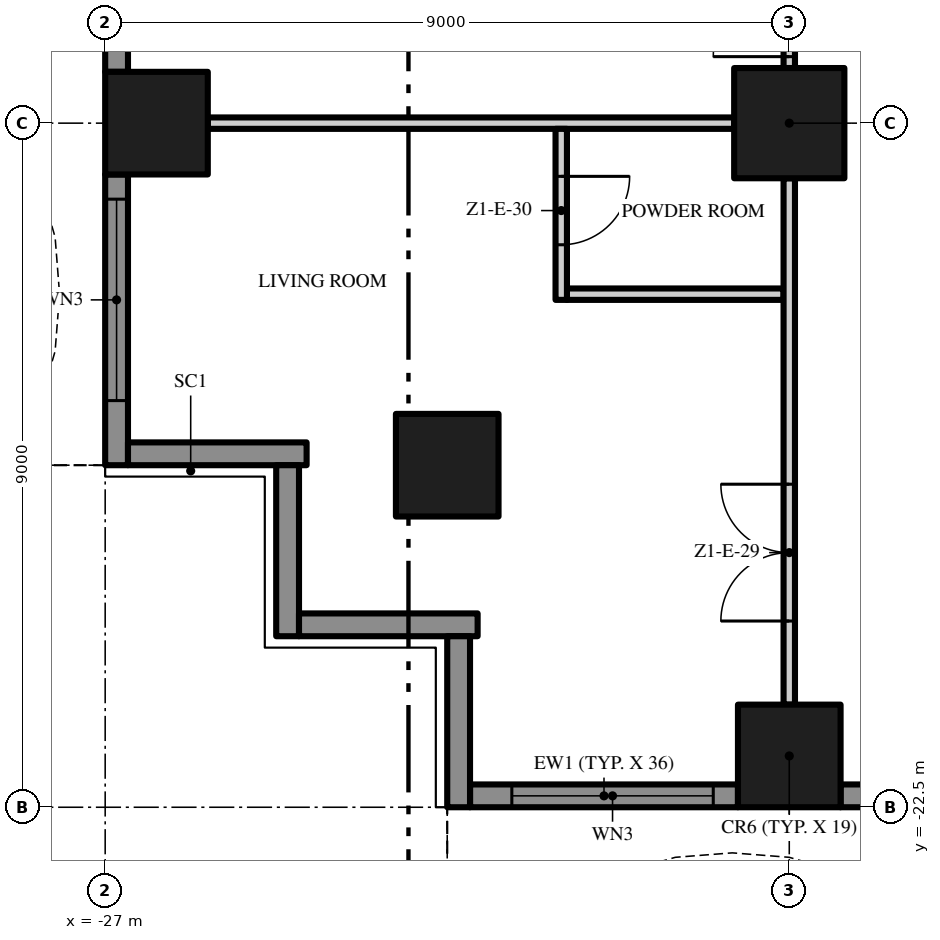
"""IFC4 building model, lengths in metres.
Left out: names, types, materials, properties, quantities, classifications, styles, units other than length and angle.
Written with IfcOpenShell. Run it as: python <this file> out.ifc"""

import sys

from ifc_helpers import new_model, si_unit, direction, frame, frame_2d, origin, origin_2d, place, context, subcontext, project, spatial, polyline, rectangle, outline, extrude, element, fill, save


model = new_model("IFC4")
c1 = context("Model", 3, precision=1e-05, world=origin(), true_north=direction((0.0, 1.0)))
c2 = subcontext(c1, "Body", "Model", "MODEL_VIEW")
j1 = project(units=[si_unit("LENGTHUNIT", "METRE"), si_unit("PLANEANGLEUNIT", "RADIAN")], contexts=[c1])
p1 = place(None, origin())
s1 = spatial("IfcSite", under=j1, at=p1, CompositionType="ELEMENT")
p2 = place(p1, origin())
s2 = spatial("IfcBuilding", under=s1, at=p2, CompositionType="ELEMENT")
p3 = place(p2, frame((0.0, 0.0, 60.6)))
s3 = spatial("IfcBuildingStorey", under=s2, at=p3, CompositionType="ELEMENT", Elevation=60.6)
p4 = place(p3, frame((-18.0, -13.5, 0.0), z_axis=(0.0, 0.0, 1.0), x_axis=(1.0, 0.0, 0.0)))
e1 = element("IfcColumn", 1, at=p4, inside=s3, PredefinedType="COLUMN", context=c2, shape_type="SweptSolid", body=[
    extrude(rectangle(XDim=1.45, YDim=1.45, at=origin_2d()), origin(), (0.0, 0.0, 1.0), 3.5),
])
for number, where, z_axis, x_axis in (
    (2, (-18.0, -21.825, 0.0), (0.0, 0.0, 1.0), (1.0, 0.0, 0.0)),
    (3, (-26.325, -13.5, 0.0), (0.0, 0.0, 1.0), (1.0, 0.0, 0.0)),
    (4, (-22.5, -18.0, 0.0), (0.0, 0.0, 1.0), (1.0, 0.0, 0.0)),
):
    element("IfcColumn", number, at=place(p3, frame(where, z_axis=z_axis, x_axis=x_axis)), inside=s3, PredefinedType="COLUMN", context=c2, shape_type="SweptSolid", body=[
        extrude(rectangle(XDim=1.35, YDim=1.35, at=origin_2d()), origin(), (0.0, 0.0, 1.0), 3.5),
    ])
p5 = place(p3, frame((-18.675, -22.35, 0.0), z_axis=(0.0, 0.0, 1.0), x_axis=(-1.0, 0.0, 0.0)))
e5 = element("IfcWall", 5, at=p5, inside=s3, PredefinedType="SOLIDWALL", context=c2, shape_type="SweptSolid", body=[
    extrude(rectangle(XDim=3.525, YDim=0.3, at=frame_2d((1.762, 0.0))), origin(), (0.0, 0.0, 1.0), 3.5),
])
p6 = place(p5, frame((0.325, 0.0, 0.45)))
e6 = element("IfcOpeningElement", 6, at=p6, cuts=e5, PredefinedType="OPENING", context=c2, shape_type="SweptSolid", body=[
    extrude(rectangle(XDim=2.65, YDim=2.65, at=frame_2d((1.325, 1.325))), frame((0.0, 0.16, 0.0), z_axis=(0.0, -1.0, 0.0), x_axis=(1.0, 0.0, 0.0)), (0.0, 0.0, 1.0), 0.32),
])
p7 = place(p3, frame((-9.675, -22.35, 0.0), z_axis=(0.0, 0.0, 1.0), x_axis=(-1.0, 0.0, 0.0)))
e7 = element("IfcWall", 7, at=p7, inside=s3, PredefinedType="SOLIDWALL", context=c2, shape_type="SweptSolid", body=[
    extrude(rectangle(XDim=7.65, YDim=0.3, at=frame_2d((3.825, 0.0))), origin(), (0.0, 0.0, 1.0), 3.5),
])
p8 = place(p7, frame((4.675, 0.0, 0.45)))
e8 = element("IfcOpeningElement", 8, at=p8, cuts=e7, PredefinedType="OPENING", context=c2, shape_type="SweptSolid", body=[
    extrude(rectangle(XDim=2.65, YDim=2.65, at=frame_2d((1.325, 1.325))), frame((0.0, 0.16, 0.0), z_axis=(0.0, -1.0, 0.0), x_axis=(1.0, 0.0, 0.0)), (0.0, 0.0, 1.0), 0.32),
])
p9 = place(p7, frame((0.325, 0.0, 0.0)))
e9 = element("IfcOpeningElement", 9, at=p9, cuts=e7, PredefinedType="OPENING", context=c2, shape_type="SweptSolid", body=[
    extrude(rectangle(XDim=2.65, YDim=2.4, at=frame_2d((1.325, 1.2))), frame((0.0, 0.16, 0.0), z_axis=(0.0, -1.0, 0.0), x_axis=(1.0, 0.0, 0.0)), (0.0, 0.0, 1.0), 0.32),
])
p10 = place(p3, frame((-26.85, -12.825, 0.0), z_axis=(0.0, 0.0, 1.0), x_axis=(0.0, 1.0, 0.0)))
e10 = element("IfcWall", 10, at=p10, inside=s3, PredefinedType="SOLIDWALL", context=c2, shape_type="SweptSolid", body=[
    extrude(rectangle(XDim=7.65, YDim=0.3, at=frame_2d((3.825, 0.0))), origin(), (0.0, 0.0, 1.0), 3.5),
])
p11 = place(p10, frame((4.675, 0.0, 0.0)))
e11 = element("IfcOpeningElement", 11, at=p11, cuts=e10, PredefinedType="OPENING", context=c2, shape_type="SweptSolid", body=[
    extrude(rectangle(XDim=2.65, YDim=2.4, at=frame_2d((1.325, 1.2))), frame((0.0, 0.16, 0.0), z_axis=(0.0, -1.0, 0.0), x_axis=(1.0, 0.0, 0.0)), (0.0, 0.0, 1.0), 0.32),
])
p12 = place(p10, frame((0.325, 0.0, 0.45)))
e12 = element("IfcOpeningElement", 12, at=p12, cuts=e10, PredefinedType="OPENING", context=c2, shape_type="SweptSolid", body=[
    extrude(rectangle(XDim=2.65, YDim=2.65, at=frame_2d((1.325, 1.325))), frame((0.0, 0.16, 0.0), z_axis=(0.0, -1.0, 0.0), x_axis=(1.0, 0.0, 0.0)), (0.0, 0.0, 1.0), 0.32),
])
p13 = place(p3, frame((-26.85, -18.0, 0.0), z_axis=(0.0, 0.0, 1.0), x_axis=(0.0, 1.0, 0.0)))
e13 = element("IfcWall", 13, at=p13, inside=s3, PredefinedType="SOLIDWALL", context=c2, shape_type="SweptSolid", body=[
    extrude(rectangle(XDim=3.825, YDim=0.3, at=frame_2d((1.913, 0.0))), origin(), (0.0, 0.0, 1.0), 3.5),
])
p14 = place(p13, frame((0.85, 0.0, 0.45)))
e14 = element("IfcOpeningElement", 14, at=p14, cuts=e13, PredefinedType="OPENING", context=c2, shape_type="SweptSolid", body=[
    extrude(rectangle(XDim=2.65, YDim=2.65, at=frame_2d((1.325, 1.325))), frame((0.0, 0.16, 0.0), z_axis=(0.0, -1.0, 0.0), x_axis=(1.0, 0.0, 0.0)), (0.0, 0.0, 1.0), 0.32),
])
p15 = place(p3, frame((-24.35, -17.85, 0.0), z_axis=(0.0, 0.0, 1.0), x_axis=(-1.0, 0.0, 0.0)))
e15 = element("IfcWall", 15, at=p15, inside=s3, PredefinedType="SOLIDWALL", context=c2, shape_type="SweptSolid", body=[
    extrude(rectangle(XDim=2.35, YDim=0.3, at=frame_2d((1.175, 0.0))), origin(), (0.0, 0.0, 1.0), 3.5),
])
p16 = place(p3, frame((-24.6, -20.25, 0.0), z_axis=(0.0, 0.0, 1.0), x_axis=(0.0, 1.0, 0.0)))
e16 = element("IfcWall", 16, at=p16, inside=s3, PredefinedType="SOLIDWALL", context=c2, shape_type="SweptSolid", body=[
    extrude(rectangle(XDim=2.25, YDim=0.3, at=frame_2d((1.125, 0.0))), origin(), (0.0, 0.0, 1.0), 3.5),
])
p17 = place(p3, frame((-22.1, -20.1, 0.0), z_axis=(0.0, 0.0, 1.0), x_axis=(-1.0, 0.0, 0.0)))
e17 = element("IfcWall", 17, at=p17, inside=s3, PredefinedType="SOLIDWALL", context=c2, shape_type="SweptSolid", body=[
    extrude(rectangle(XDim=2.35, YDim=0.3, at=frame_2d((1.175, 0.0))), origin(), (0.0, 0.0, 1.0), 3.5),
])
p18 = place(p3, frame((-22.35, -22.5, 0.0), z_axis=(0.0, 0.0, 1.0), x_axis=(0.0, 1.0, 0.0)))
e18 = element("IfcWall", 18, at=p18, inside=s3, PredefinedType="SOLIDWALL", context=c2, shape_type="SweptSolid", body=[
    extrude(rectangle(XDim=2.25, YDim=0.3, at=frame_2d((1.125, 0.0))), origin(), (0.0, 0.0, 1.0), 3.5),
])
p19 = place(p3, origin())
e19 = element("IfcWall", 19, at=p19, inside=s3, PredefinedType="USERDEFINED", context=c2, shape_type="SweptSolid", body=[
    extrude(outline(polyline([(-22.5, -24.3), (-21.0, -23.595), (-19.5, -23.159), (-18.75, -23.1), (-18.0, -23.159), (-16.5, -23.595), (-15.0, -24.3), (-13.5, -25.005), (-12.0, -25.441), (-11.25, -25.5), (-10.5, -25.441), (-9.0, -25.005), (-7.5, -24.3), (-6.0, -23.595), (-4.5, -23.159), (-3.75, -23.1), (-3.0, -23.159), (-1.5, -23.595), (0.0, -24.3), (1.5, -25.005), (3.0, -25.441), (3.75, -25.5), (4.5, -25.441), (6.0, -25.005), (7.5, -24.3), (9.0, -23.595), (10.5, -23.159), (11.25, -23.1), (12.0, -23.159), (13.5, -23.595), (15.0, -24.3), (16.5, -25.005), (18.0, -25.441), (18.75, -25.5), (19.5, -25.441), (21.0, -25.005), (22.5, -24.3), (22.394, -24.074), (20.911, -24.771), (19.455, -25.194), (18.75, -25.249), (18.045, -25.194), (16.589, -24.771), (15.106, -24.074), (13.589, -23.36), (12.045, -22.911), (11.25, -22.849), (10.455, -22.911), (8.911, -23.36), (7.394, -24.074), (5.911, -24.771), (4.455, -25.194), (3.75, -25.249), (3.045, -25.194), (1.589, -24.771), (0.106, -24.074), (-1.411, -23.36), (-2.955, -22.911), (-3.75, -22.849), (-4.545, -22.911), (-6.089, -23.36), (-7.606, -24.074), (-9.089, -24.771), (-10.545, -25.194), (-11.25, -25.249), (-11.955, -25.194), (-13.411, -24.771), (-14.894, -24.074), (-16.411, -23.36), (-17.955, -22.911), (-18.75, -22.849), (-19.545, -22.911), (-21.089, -23.36), (-22.606, -24.074), (-22.5, -24.3)])), origin(), (0.0, 0.0, 1.0), 0.9),
])
p20 = place(p3, origin())
e20 = element("IfcWall", 20, at=p20, inside=s3, PredefinedType="USERDEFINED", context=c2, shape_type="SweptSolid", body=[
    extrude(outline(polyline([(-28.8, 18.0), (-28.095, 16.5), (-27.659, 15.0), (-27.6, 14.25), (-27.659, 13.5), (-28.095, 12.0), (-28.8, 10.5), (-29.505, 9.0), (-29.941, 7.5), (-30.0, 6.75), (-29.941, 6.0), (-29.505, 4.5), (-28.8, 3.0), (-28.095, 1.5), (-27.659, 0.0), (-27.6, -0.75), (-27.659, -1.5), (-28.095, -3.0), (-28.8, -4.5), (-29.505, -6.0), (-29.941, -7.5), (-30.0, -8.25), (-29.941, -9.0), (-29.505, -10.5), (-28.8, -12.0), (-28.095, -13.5), (-27.659, -15.0), (-27.6, -15.75), (-27.659, -16.5), (-28.095, -18.0), (-27.855, -18.07), (-27.411, -16.545), (-27.349, -15.75), (-27.411, -14.955), (-27.86, -13.411), (-28.574, -11.894), (-29.271, -10.411), (-29.694, -8.955), (-29.749, -8.25), (-29.694, -7.545), (-29.271, -6.089), (-28.574, -4.606), (-27.86, -3.089), (-27.411, -1.545), (-27.349, -0.75), (-27.411, 0.045), (-27.86, 1.589), (-28.574, 3.106), (-29.271, 4.589), (-29.694, 6.045), (-29.749, 6.75), (-29.694, 7.455), (-29.271, 8.911), (-28.574, 10.394), (-27.86, 11.911), (-27.411, 13.455), (-27.349, 14.25), (-27.411, 15.045), (-27.86, 16.589), (-28.574, 18.106), (-28.8, 18.0)])), origin(), (0.0, 0.0, 1.0), 0.9),
])
p21 = place(p3, frame((-20.925, -15.75, 0.0), z_axis=(0.0, 0.0, 1.0), x_axis=(1.0, 0.0, 0.0)))
e21 = element("IfcWall", 21, at=p21, inside=s3, PredefinedType="PARTITIONING", context=c2, shape_type="SweptSolid", body=[
    extrude(rectangle(XDim=2.85, YDim=0.15, at=frame_2d((1.425, 0.0))), origin(), (0.0, 0.0, 1.0), 3.5),
])
p22 = place(p3, frame((-25.65, -13.5, 0.0), z_axis=(0.0, 0.0, 1.0), x_axis=(1.0, 0.0, 0.0)))
e22 = element("IfcWall", 22, at=p22, inside=s3, PredefinedType="PARTITIONING", context=c2, shape_type="SweptSolid", body=[
    extrude(rectangle(XDim=6.925, YDim=0.15, at=frame_2d((3.462, 0.0))), origin(), (0.0, 0.0, 1.0), 3.5),
])
p23 = place(p3, frame((-21.0, -13.575, 0.0), z_axis=(0.0, 0.0, 1.0), x_axis=(0.0, -1.0, 0.0)))
e23 = element("IfcWall", 23, at=p23, inside=s3, PredefinedType="PARTITIONING", context=c2, shape_type="SweptSolid", body=[
    extrude(rectangle(XDim=2.25, YDim=0.15, at=frame_2d((1.125, 0.0))), origin(), (0.0, 0.0, 1.0), 3.5),
])
p24 = place(p23, frame((0.625, 0.0, 0.0)))
e24 = element("IfcOpeningElement", 24, at=p24, cuts=e23, PredefinedType="OPENING", context=c2, shape_type="SweptSolid", body=[
    extrude(rectangle(XDim=0.9, YDim=2.1, at=frame_2d((0.45, 1.05))), frame((0.0, 0.085, 0.0), z_axis=(0.0, -1.0, 0.0), x_axis=(1.0, 0.0, 0.0)), (0.0, 0.0, 1.0), 0.17),
])
p25 = place(p3, frame((-18.0, -21.15, 0.0), z_axis=(0.0, 0.0, 1.0), x_axis=(0.0, 1.0, 0.0)))
e25 = element("IfcWall", 25, at=p25, inside=s3, PredefinedType="PARTITIONING", context=c2, shape_type="SweptSolid", body=[
    extrude(rectangle(XDim=6.925, YDim=0.15, at=frame_2d((3.462, 0.0))), origin(), (0.0, 0.0, 1.0), 3.5),
])
p26 = place(p25, frame((1.1, 0.0, 0.0)))
e26 = element("IfcOpeningElement", 26, at=p26, cuts=e25, PredefinedType="OPENING", context=c2, shape_type="SweptSolid", body=[
    extrude(rectangle(XDim=1.8, YDim=2.4, at=frame_2d((0.9, 1.2))), frame((0.0, 0.085, 0.0), z_axis=(0.0, -1.0, 0.0), x_axis=(1.0, 0.0, 0.0)), (0.0, 0.0, 1.0), 0.17),
])
p27 = place(p3, frame((-18.0, -12.775, 0.0), z_axis=(0.0, 0.0, 1.0), x_axis=(0.0, 1.0, 0.0)))
e27 = element("IfcWall", 27, at=p27, inside=s3, PredefinedType="PARTITIONING", context=c2, shape_type="SweptSolid", body=[
    extrude(rectangle(XDim=7.55, YDim=0.15, at=frame_2d((3.775, 0.0))), origin(), (0.0, 0.0, 1.0), 3.5),
])
p28 = place(p27, frame((6.4, 0.0, 0.0)))
e28 = element("IfcOpeningElement", 28, at=p28, cuts=e27, PredefinedType="OPENING", context=c2, shape_type="SweptSolid", body=[
    extrude(rectangle(XDim=1.0, YDim=2.4, at=frame_2d((0.5, 1.2))), frame((0.0, 0.085, 0.0), z_axis=(0.0, -1.0, 0.0), x_axis=(1.0, 0.0, 0.0)), (0.0, 0.0, 1.0), 0.17),
])
p29 = place(p27, frame((0.15, 0.0, 0.0)))
e29 = element("IfcOpeningElement", 29, at=p29, cuts=e27, PredefinedType="OPENING", context=c2, shape_type="SweptSolid", body=[
    extrude(rectangle(XDim=1.0, YDim=2.4, at=frame_2d((0.5, 1.2))), frame((0.0, 0.085, 0.0), z_axis=(0.0, -1.0, 0.0), x_axis=(1.0, 0.0, 0.0)), (0.0, 0.0, 1.0), 0.17),
])
p30 = place(p6, origin())
e30 = element("IfcWindow", 30, at=p30, inside=s3, PartitioningType="SINGLE_PANEL", PredefinedType="WINDOW", context=c2, shape_type="SweptSolid", body=[
    extrude(rectangle(XDim=2.65, YDim=2.65, at=frame_2d((1.325, 1.325))), frame((0.0, 0.03, 0.0), z_axis=(0.0, -1.0, 0.0), x_axis=(1.0, 0.0, 0.0)), (0.0, 0.0, 1.0), 0.06),
])
fill(e6, e30)
p31 = place(p14, origin())
e31 = element("IfcWindow", 31, at=p31, inside=s3, PartitioningType="SINGLE_PANEL", PredefinedType="WINDOW", context=c2, shape_type="SweptSolid", body=[
    extrude(rectangle(XDim=2.65, YDim=2.65, at=frame_2d((1.325, 1.325))), frame((0.0, 0.03, 0.0), z_axis=(0.0, -1.0, 0.0), x_axis=(1.0, 0.0, 0.0)), (0.0, 0.0, 1.0), 0.06),
])
fill(e14, e31)
p32 = place(p29, origin())
e32 = element("IfcDoor", 32, at=p32, inside=s3, OperationType="SINGLE_SWING_LEFT", PredefinedType="DOOR", context=c2, shape_type="SweptSolid", body=[
    extrude(rectangle(XDim=1.0, YDim=2.4, at=frame_2d((0.5, 1.2))), frame((0.0, 0.025, 0.0), z_axis=(0.0, -1.0, 0.0), x_axis=(1.0, 0.0, 0.0)), (0.0, 0.0, 1.0), 0.05),
])
fill(e29, e32)
p33 = place(p26, origin())
e33 = element("IfcDoor", 33, at=p33, inside=s3, OperationType="DOUBLE_DOOR_SINGLE_SWING", PredefinedType="DOOR", context=c2, shape_type="SweptSolid", body=[
    extrude(rectangle(XDim=1.8, YDim=2.4, at=frame_2d((0.9, 1.2))), frame((0.0, 0.025, 0.0), z_axis=(0.0, -1.0, 0.0), x_axis=(1.0, 0.0, 0.0)), (0.0, 0.0, 1.0), 0.05),
])
fill(e26, e33)
p34 = place(p24, origin())
e34 = element("IfcDoor", 34, at=p34, inside=s3, OperationType="SINGLE_SWING_LEFT", PredefinedType="DOOR", context=c2, shape_type="SweptSolid", body=[
    extrude(rectangle(XDim=0.9, YDim=2.1, at=frame_2d((0.45, 1.05))), frame((0.0, 0.025, 0.0), z_axis=(0.0, -1.0, 0.0), x_axis=(1.0, 0.0, 0.0)), (0.0, 0.0, 1.0), 0.05),
])
fill(e24, e34)
save(model, sys.argv[1])
